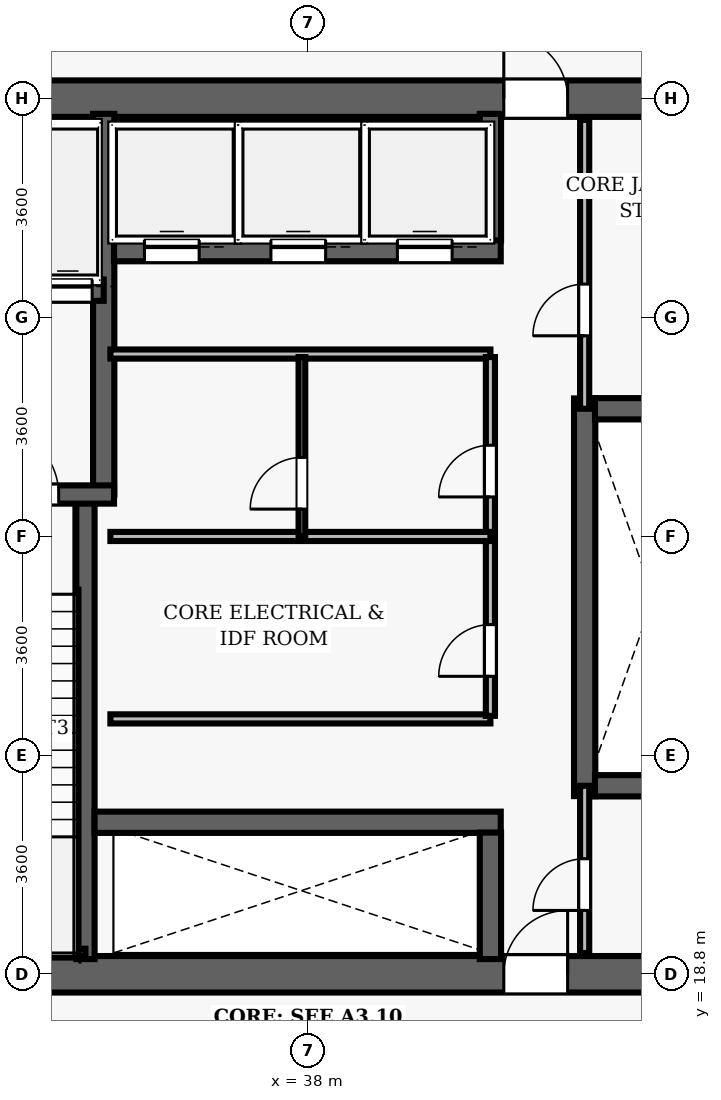
"""IFC4 building model, lengths in metres.
Left out: names, types, materials, properties, quantities, classifications, styles, units other than length and angle.
Written with IfcOpenShell. Run it as: python <this file> out.ifc"""

import sys

from ifc_helpers import new_model, si_unit, direction, frame, frame_2d, origin, place, context, subcontext, project, spatial, rectangle, extrude, element, fill, save


model = new_model("IFC4")
c1 = context("Model", 3, precision=1e-05, world=origin(), true_north=direction((0.0, 1.0)))
c2 = subcontext(c1, "Body", "Model", "MODEL_VIEW")
j1 = project(units=[si_unit("LENGTHUNIT", "METRE"), si_unit("PLANEANGLEUNIT", "RADIAN")], contexts=[c1])
p1 = place(None, origin())
s1 = spatial("IfcSite", under=j1, at=p1, CompositionType="ELEMENT")
p2 = place(p1, origin())
s2 = spatial("IfcBuilding", under=s1, at=p2, CompositionType="ELEMENT")
p3 = place(p2, frame((0.0, 0.0, 97.4)))
s3 = spatial("IfcBuildingStorey", under=s2, at=p3, CompositionType="ELEMENT", Elevation=97.4)
p4 = place(p3, frame((26.7, 18.8, 0.0), z_axis=(0.0, 0.0, 1.0), x_axis=(1.0, 0.0, 0.0)))
e1 = element("IfcWall", 1, at=p4, inside=s3, PredefinedType="SHEAR", context=c2, shape_type="SweptSolid", body=[
    extrude(rectangle(XDim=22.6, YDim=0.6, at=frame_2d((11.3, 0.0))), origin(), (0.0, 0.0, 1.0), 5.4),
])
p5 = place(p4, frame((14.52, 0.0, 0.0)))
e2 = element("IfcOpeningElement", 2, at=p5, cuts=e1, PredefinedType="OPENING", context=c2, shape_type="SweptSolid", body=[
    extrude(rectangle(XDim=1.05, YDim=2.15, at=frame_2d((0.525, 1.075))), frame((0.0, 0.31, 0.0), z_axis=(0.0, -1.0, 0.0), x_axis=(1.0, 0.0, 0.0)), (0.0, 0.0, 1.0), 0.62),
])
p6 = place(p3, frame((26.7, 33.2, 0.0), z_axis=(0.0, 0.0, 1.0), x_axis=(1.0, 0.0, 0.0)))
e3 = element("IfcWall", 3, at=p6, inside=s3, PredefinedType="SHEAR", context=c2, shape_type="SweptSolid", body=[
    extrude(rectangle(XDim=22.6, YDim=0.6, at=frame_2d((11.3, 0.0))), origin(), (0.0, 0.0, 1.0), 5.4),
])
p7 = place(p6, frame((4.62, 0.0, 0.0)))
e4 = element("IfcOpeningElement", 4, at=p7, cuts=e3, PredefinedType="OPENING", context=c2, shape_type="SweptSolid", body=[
    extrude(rectangle(XDim=1.05, YDim=2.15, at=frame_2d((0.525, 1.075))), frame((0.0, 0.31, 0.0), z_axis=(0.0, -1.0, 0.0), x_axis=(1.0, 0.0, 0.0)), (0.0, 0.0, 1.0), 0.62),
])
p8 = place(p6, frame((14.52, 0.0, 0.0)))
e5 = element("IfcOpeningElement", 5, at=p8, cuts=e3, PredefinedType="OPENING", context=c2, shape_type="SweptSolid", body=[
    extrude(rectangle(XDim=1.05, YDim=2.15, at=frame_2d((0.525, 1.075))), frame((0.0, 0.31, 0.0), z_axis=(0.0, -1.0, 0.0), x_axis=(1.0, 0.0, 0.0)), (0.0, 0.0, 1.0), 0.62),
])
p9 = place(p3, frame((34.34, 19.05, 0.0), z_axis=(0.0, 0.0, 1.0), x_axis=(0.0, 1.0, 0.0)))
e6 = element("IfcWall", 6, at=p9, inside=s3, PredefinedType="SHEAR", context=c2, shape_type="SweptSolid", body=[
    extrude(rectangle(XDim=7.5, YDim=0.3, at=frame_2d((3.75, 0.0))), origin(), (0.0, 0.0, 1.0), 5.4),
])
p10 = place(p3, frame((34.64, 26.69, 0.0), z_axis=(0.0, 0.0, 1.0), x_axis=(0.0, 1.0, 0.0)))
e7 = element("IfcWall", 7, at=p10, inside=s3, PredefinedType="SHEAR", context=c2, shape_type="SweptSolid", body=[
    extrude(rectangle(XDim=6.26, YDim=0.35, at=frame_2d((3.13, 0.0))), origin(), (0.0, 0.0, 1.0), 5.4),
])
p11 = place(p3, frame((31.25, 26.69, 0.0), z_axis=(0.0, 0.0, 1.0), x_axis=(1.0, 0.0, 0.0)))
e8 = element("IfcWall", 8, at=p11, inside=s3, PredefinedType="SHEAR", context=c2, shape_type="SweptSolid", body=[
    extrude(rectangle(XDim=3.56, YDim=0.3, at=frame_2d((1.78, 0.0))), origin(), (0.0, 0.0, 1.0), 5.4),
])
p12 = place(p11, frame((1.55, 0.0, 0.0)))
e9 = element("IfcOpeningElement", 9, at=p12, cuts=e8, PredefinedType="OPENING", context=c2, shape_type="SweptSolid", body=[
    extrude(rectangle(XDim=1.1, YDim=2.15, at=frame_2d((0.55, 1.075))), frame((0.0, 0.16, 0.0), z_axis=(0.0, -1.0, 0.0), x_axis=(1.0, 0.0, 0.0)), (0.0, 0.0, 1.0), 0.32),
])
p13 = place(p3, frame((31.3, 19.16, 0.0), z_axis=(0.0, 0.0, 1.0), x_axis=(1.0, 0.0, 0.0)))
e10 = element("IfcWall", 10, at=p13, inside=s3, PredefinedType="SHEAR", context=c2, shape_type="SweptSolid", body=[
    extrude(rectangle(XDim=3.04, YDim=0.12, at=frame_2d((1.52, 0.0))), origin(), (0.0, 0.0, 1.0), 5.4),
])
p14 = place(p3, frame((32.23, 30.05, 0.0), z_axis=(0.0, 0.0, 1.0), x_axis=(1.0, 0.0, 0.0)))
e11 = element("IfcWall", 11, at=p14, inside=s3, PredefinedType="SHEAR", context=c2, shape_type="SweptSolid", body=[
    extrude(rectangle(XDim=2.41, YDim=0.35, at=frame_2d((1.205, 0.0))), origin(), (0.0, 0.0, 1.0), 4.04),
])
p15 = place(p14, frame((0.42, 0.0, 0.0)))
e12 = element("IfcOpeningElement", 12, at=p15, cuts=e11, PredefinedType="OPENING", context=c2, shape_type="SweptSolid", body=[
    extrude(rectangle(XDim=0.8, YDim=2.15, at=frame_2d((0.4, 1.075))), frame((0.0, 0.185, 0.0), z_axis=(0.0, -1.0, 0.0), x_axis=(1.0, 0.0, 0.0)), (0.0, 0.0, 1.0), 0.37),
])
p16 = place(p14, frame((1.42, 0.0, 0.0)))
e13 = element("IfcOpeningElement", 13, at=p16, cuts=e11, PredefinedType="OPENING", context=c2, shape_type="SweptSolid", body=[
    extrude(rectangle(XDim=0.8, YDim=2.15, at=frame_2d((0.4, 1.075))), frame((0.0, 0.185, 0.0), z_axis=(0.0, -1.0, 0.0), x_axis=(1.0, 0.0, 0.0)), (0.0, 0.0, 1.0), 0.37),
])
p17 = place(p3, frame((42.55, 21.73, 0.0), z_axis=(0.0, 0.0, 1.0), x_axis=(0.0, 1.0, 0.0)))
e14 = element("IfcWall", 14, at=p17, inside=s3, PredefinedType="SHEAR", context=c2, shape_type="SweptSolid", body=[
    extrude(rectangle(XDim=6.54, YDim=0.35, at=frame_2d((3.27, 0.0))), origin(), (0.0, 0.0, 1.0), 4.04),
])
for number, where, z_axis, x_axis in (
    (15, (42.72, 21.9, 0.0), (0.0, 0.0, 1.0), (1.0, 0.0, 0.0)),
    (16, (42.72, 28.1, 0.0), (0.0, 0.0, 1.0), (1.0, 0.0, 0.0)),
):
    element("IfcWall", number, at=place(p3, frame(where, z_axis=z_axis, x_axis=x_axis)), inside=s3, PredefinedType="SHEAR", context=c2, shape_type="SweptSolid", body=[
        extrude(rectangle(XDim=2.03, YDim=0.35, at=frame_2d((1.015, 0.0))), origin(), (0.0, 0.0, 1.0), 4.04),
    ])
p18 = place(p3, frame((34.81, 30.7, 0.0), z_axis=(0.0, 0.0, 1.0), x_axis=(1.0, 0.0, 0.0)))
e17 = element("IfcWall", 17, at=p18, inside=s3, PredefinedType="SHEAR", context=c2, shape_type="SweptSolid", body=[
    extrude(rectangle(XDim=6.36, YDim=0.35, at=frame_2d((3.18, 0.0))), origin(), (0.0, 0.0, 1.0), 4.04),
])
p19 = place(p18, frame((0.5, 0.0, 0.0)))
e18 = element("IfcOpeningElement", 18, at=p19, cuts=e17, PredefinedType="OPENING", context=c2, shape_type="SweptSolid", body=[
    extrude(rectangle(XDim=0.9, YDim=2.15, at=frame_2d((0.45, 1.075))), frame((0.0, 0.185, 0.0), z_axis=(0.0, -1.0, 0.0), x_axis=(1.0, 0.0, 0.0)), (0.0, 0.0, 1.0), 0.37),
])
p20 = place(p18, frame((2.58, 0.0, 0.0)))
e19 = element("IfcOpeningElement", 19, at=p20, cuts=e17, PredefinedType="OPENING", context=c2, shape_type="SweptSolid", body=[
    extrude(rectangle(XDim=0.9, YDim=2.15, at=frame_2d((0.45, 1.075))), frame((0.0, 0.185, 0.0), z_axis=(0.0, -1.0, 0.0), x_axis=(1.0, 0.0, 0.0)), (0.0, 0.0, 1.0), 0.37),
])
p21 = place(p18, frame((4.66, 0.0, 0.0)))
e20 = element("IfcOpeningElement", 20, at=p21, cuts=e17, PredefinedType="OPENING", context=c2, shape_type="SweptSolid", body=[
    extrude(rectangle(XDim=0.9, YDim=2.15, at=frame_2d((0.45, 1.075))), frame((0.0, 0.185, 0.0), z_axis=(0.0, -1.0, 0.0), x_axis=(1.0, 0.0, 0.0)), (0.0, 0.0, 1.0), 0.37),
])
p22 = place(p3, frame((41.0, 30.87, 0.0), z_axis=(0.0, 0.0, 1.0), x_axis=(0.0, 1.0, 0.0)))
e21 = element("IfcWall", 21, at=p22, inside=s3, PredefinedType="SHEAR", context=c2, shape_type="SweptSolid", body=[
    extrude(rectangle(XDim=2.08, YDim=0.35, at=frame_2d((1.04, 0.0))), origin(), (0.0, 0.0, 1.0), 4.04),
])
p23 = place(p3, frame((34.49, 21.3, 0.0), z_axis=(0.0, 0.0, 1.0), x_axis=(1.0, 0.0, 0.0)))
e22 = element("IfcWall", 22, at=p23, inside=s3, PredefinedType="SHEAR", context=c2, shape_type="SweptSolid", body=[
    extrude(rectangle(XDim=6.68, YDim=0.35, at=frame_2d((3.34, 0.0))), origin(), (0.0, 0.0, 1.0), 4.04),
])
p24 = place(p3, frame((41.0, 19.05, 0.0), z_axis=(0.0, 0.0, 1.0), x_axis=(0.0, 1.0, 0.0)))
e23 = element("IfcWall", 23, at=p24, inside=s3, PredefinedType="SHEAR", context=c2, shape_type="SweptSolid", body=[
    extrude(rectangle(XDim=2.08, YDim=0.35, at=frame_2d((1.04, 0.0))), origin(), (0.0, 0.0, 1.0), 4.04),
])
for number, where, z_axis, x_axis in (
    (24, (34.75, 29.0, 0.0), (0.0, 0.0, 1.0), (1.0, 0.0, 0.0)),
    (25, (34.75, 23.0, 0.0), (0.0, 0.0, 1.0), (1.0, 0.0, 0.0)),
):
    element("IfcWall", number, at=place(p3, frame(where, z_axis=z_axis, x_axis=x_axis)), inside=s3, PredefinedType="PARTITIONING", context=c2, shape_type="SweptSolid", body=[
        extrude(rectangle(XDim=6.25, YDim=0.15, at=frame_2d((3.125, 0.0))), origin(), (0.0, 0.0, 1.0), 4.04),
    ])
p25 = place(p3, frame((41.0, 23.05, 0.0), z_axis=(0.0, 0.0, 1.0), x_axis=(0.0, 1.0, 0.0)))
e26 = element("IfcWall", 26, at=p25, inside=s3, PredefinedType="PARTITIONING", context=c2, shape_type="SweptSolid", body=[
    extrude(rectangle(XDim=5.9, YDim=0.15, at=frame_2d((2.95, 0.0))), origin(), (0.0, 0.0, 1.0), 4.04),
])
p26 = place(p25, frame((0.65, 0.0, 0.0)))
e27 = element("IfcOpeningElement", 27, at=p26, cuts=e26, PredefinedType="OPENING", context=c2, shape_type="SweptSolid", body=[
    extrude(rectangle(XDim=0.85, YDim=2.1, at=frame_2d((0.425, 1.05))), frame((0.0, 0.085, 0.0), z_axis=(0.0, -1.0, 0.0), x_axis=(1.0, 0.0, 0.0)), (0.0, 0.0, 1.0), 0.17),
])
p27 = place(p25, frame((3.6, 0.0, 0.0)))
e28 = element("IfcOpeningElement", 28, at=p27, cuts=e26, PredefinedType="OPENING", context=c2, shape_type="SweptSolid", body=[
    extrude(rectangle(XDim=0.85, YDim=2.1, at=frame_2d((0.425, 1.05))), frame((0.0, 0.085, 0.0), z_axis=(0.0, -1.0, 0.0), x_axis=(1.0, 0.0, 0.0)), (0.0, 0.0, 1.0), 0.17),
])
p28 = place(p3, frame((34.75, 26.0, 0.0), z_axis=(0.0, 0.0, 1.0), x_axis=(1.0, 0.0, 0.0)))
e29 = element("IfcWall", 29, at=p28, inside=s3, PredefinedType="PARTITIONING", context=c2, shape_type="SweptSolid", body=[
    extrude(rectangle(XDim=6.25, YDim=0.15, at=frame_2d((3.125, 0.0))), origin(), (0.0, 0.0, 1.0), 4.04),
])
p29 = place(p3, frame((37.9, 26.0, 0.0), z_axis=(0.0, 0.0, 1.0), x_axis=(0.0, 1.0, 0.0)))
e30 = element("IfcWall", 30, at=p29, inside=s3, PredefinedType="PARTITIONING", context=c2, shape_type="SweptSolid", body=[
    extrude(rectangle(XDim=2.95, YDim=0.11, at=frame_2d((1.475, 0.0))), origin(), (0.0, 0.0, 1.0), 4.04),
])
p30 = place(p29, frame((0.45, 0.0, 0.0)))
e31 = element("IfcOpeningElement", 31, at=p30, cuts=e30, PredefinedType="OPENING", context=c2, shape_type="SweptSolid", body=[
    extrude(rectangle(XDim=0.85, YDim=2.1, at=frame_2d((0.425, 1.05))), frame((0.0, 0.065, 0.0), z_axis=(0.0, -1.0, 0.0), x_axis=(1.0, 0.0, 0.0)), (0.0, 0.0, 1.0), 0.13),
])
p31 = place(p3, frame((42.55, 28.1, 0.0), z_axis=(0.0, 0.0, 1.0), x_axis=(0.0, 1.0, 0.0)))
e32 = element("IfcWall", 32, at=p31, inside=s3, PredefinedType="PARTITIONING", context=c2, shape_type="SweptSolid", body=[
    extrude(rectangle(XDim=4.75, YDim=0.15, at=frame_2d((2.375, 0.0))), origin(), (0.0, 0.0, 1.0), 4.04),
])
p32 = place(p31, frame((1.2, 0.0, 0.0)))
e33 = element("IfcOpeningElement", 33, at=p32, cuts=e32, PredefinedType="OPENING", context=c2, shape_type="SweptSolid", body=[
    extrude(rectangle(XDim=0.85, YDim=2.1, at=frame_2d((0.425, 1.05))), frame((0.0, 0.085, 0.0), z_axis=(0.0, -1.0, 0.0), x_axis=(1.0, 0.0, 0.0)), (0.0, 0.0, 1.0), 0.17),
])
p33 = place(p3, frame((42.55, 19.15, 0.0), z_axis=(0.0, 0.0, 1.0), x_axis=(0.0, 1.0, 0.0)))
e34 = element("IfcWall", 34, at=p33, inside=s3, PredefinedType="PARTITIONING", context=c2, shape_type="SweptSolid", body=[
    extrude(rectangle(XDim=2.75, YDim=0.15, at=frame_2d((1.375, 0.0))), origin(), (0.0, 0.0, 1.0), 4.04),
])
p34 = place(p33, frame((0.7, 0.0, 0.0)))
e35 = element("IfcOpeningElement", 35, at=p34, cuts=e34, PredefinedType="OPENING", context=c2, shape_type="SweptSolid", body=[
    extrude(rectangle(XDim=0.85, YDim=2.1, at=frame_2d((0.425, 1.05))), frame((0.0, 0.085, 0.0), z_axis=(0.0, -1.0, 0.0), x_axis=(1.0, 0.0, 0.0)), (0.0, 0.0, 1.0), 0.17),
])
p35 = place(p12, origin())
e36 = element("IfcDoor", 36, at=p35, inside=s3, OperationType="SINGLE_SWING_LEFT", PredefinedType="DOOR", context=c2, shape_type="SweptSolid", body=[
    extrude(rectangle(XDim=1.1, YDim=2.15, at=frame_2d((0.55, 1.075))), frame((0.0, 0.025, 0.0), z_axis=(0.0, -1.0, 0.0), x_axis=(1.0, 0.0, 0.0)), (0.0, 0.0, 1.0), 0.05),
])
fill(e9, e36)
p36 = place(p8, origin())
e37 = element("IfcDoor", 37, at=p36, inside=s3, OperationType="SINGLE_SWING_LEFT", PredefinedType="DOOR", context=c2, shape_type="SweptSolid", body=[
    extrude(rectangle(XDim=1.05, YDim=2.15, at=frame_2d((0.525, 1.075))), frame((0.0, 0.025, 0.0), z_axis=(0.0, -1.0, 0.0), x_axis=(1.0, 0.0, 0.0)), (0.0, 0.0, 1.0), 0.05),
])
fill(e5, e37)
p37 = place(p5, origin())
e38 = element("IfcDoor", 38, at=p37, inside=s3, OperationType="SINGLE_SWING_RIGHT", PredefinedType="DOOR", context=c2, shape_type="SweptSolid", body=[
    extrude(rectangle(XDim=1.05, YDim=2.15, at=frame_2d((0.525, 1.075))), frame((0.0, 0.025, 0.0), z_axis=(0.0, -1.0, 0.0), x_axis=(1.0, 0.0, 0.0)), (0.0, 0.0, 1.0), 0.05),
])
fill(e2, e38)
p38 = place(p26, origin())
e39 = element("IfcDoor", 39, at=p38, inside=s3, OperationType="SINGLE_SWING_LEFT", PredefinedType="DOOR", context=c2, shape_type="SweptSolid", body=[
    extrude(rectangle(XDim=0.85, YDim=2.1, at=frame_2d((0.425, 1.05))), frame((0.0, 0.025, 0.0), z_axis=(0.0, -1.0, 0.0), x_axis=(1.0, 0.0, 0.0)), (0.0, 0.0, 1.0), 0.05),
])
fill(e27, e39)
p39 = place(p27, origin())
e40 = element("IfcDoor", 40, at=p39, inside=s3, OperationType="SINGLE_SWING_LEFT", PredefinedType="DOOR", context=c2, shape_type="SweptSolid", body=[
    extrude(rectangle(XDim=0.85, YDim=2.1, at=frame_2d((0.425, 1.05))), frame((0.0, 0.025, 0.0), z_axis=(0.0, -1.0, 0.0), x_axis=(1.0, 0.0, 0.0)), (0.0, 0.0, 1.0), 0.05),
])
fill(e28, e40)
p40 = place(p30, origin())
e41 = element("IfcDoor", 41, at=p40, inside=s3, OperationType="SINGLE_SWING_LEFT", PredefinedType="DOOR", context=c2, shape_type="SweptSolid", body=[
    extrude(rectangle(XDim=0.85, YDim=2.1, at=frame_2d((0.425, 1.05))), frame((0.0, 0.025, 0.0), z_axis=(0.0, -1.0, 0.0), x_axis=(1.0, 0.0, 0.0)), (0.0, 0.0, 1.0), 0.05),
])
fill(e31, e41)
p41 = place(p32, origin())
e42 = element("IfcDoor", 42, at=p41, inside=s3, OperationType="SINGLE_SWING_LEFT", PredefinedType="DOOR", context=c2, shape_type="SweptSolid", body=[
    extrude(rectangle(XDim=0.85, YDim=2.1, at=frame_2d((0.425, 1.05))), frame((0.0, 0.025, 0.0), z_axis=(0.0, -1.0, 0.0), x_axis=(1.0, 0.0, 0.0)), (0.0, 0.0, 1.0), 0.05),
])
fill(e33, e42)
p42 = place(p34, origin())
e43 = element("IfcDoor", 43, at=p42, inside=s3, OperationType="SINGLE_SWING_LEFT", PredefinedType="DOOR", context=c2, shape_type="SweptSolid", body=[
    extrude(rectangle(XDim=0.85, YDim=2.1, at=frame_2d((0.425, 1.05))), frame((0.0, 0.025, 0.0), z_axis=(0.0, -1.0, 0.0), x_axis=(1.0, 0.0, 0.0)), (0.0, 0.0, 1.0), 0.05),
])
fill(e35, e43)
p43 = place(p19, origin())
e44 = element("IfcDoor", 44, at=p43, inside=s3, OperationType="SLIDING_TO_LEFT", PredefinedType="DOOR", context=c2, shape_type="SweptSolid", body=[
    extrude(rectangle(XDim=0.9, YDim=2.15, at=frame_2d((0.45, 1.075))), frame((0.0, 0.025, 0.0), z_axis=(0.0, -1.0, 0.0), x_axis=(1.0, 0.0, 0.0)), (0.0, 0.0, 1.0), 0.05),
])
fill(e18, e44)
p44 = place(p20, origin())
e45 = element("IfcDoor", 45, at=p44, inside=s3, OperationType="SLIDING_TO_LEFT", PredefinedType="DOOR", context=c2, shape_type="SweptSolid", body=[
    extrude(rectangle(XDim=0.9, YDim=2.15, at=frame_2d((0.45, 1.075))), frame((0.0, 0.025, 0.0), z_axis=(0.0, -1.0, 0.0), x_axis=(1.0, 0.0, 0.0)), (0.0, 0.0, 1.0), 0.05),
])
fill(e19, e45)
p45 = place(p21, origin())
e46 = element("IfcDoor", 46, at=p45, inside=s3, OperationType="SLIDING_TO_LEFT", PredefinedType="DOOR", context=c2, shape_type="SweptSolid", body=[
    extrude(rectangle(XDim=0.9, YDim=2.15, at=frame_2d((0.45, 1.075))), frame((0.0, 0.025, 0.0), z_axis=(0.0, -1.0, 0.0), x_axis=(1.0, 0.0, 0.0)), (0.0, 0.0, 1.0), 0.05),
])
fill(e20, e46)
p46 = place(p16, origin())
e47 = element("IfcDoor", 47, at=p46, inside=s3, OperationType="SLIDING_TO_LEFT", PredefinedType="DOOR", context=c2, shape_type="SweptSolid", body=[
    extrude(rectangle(XDim=0.8, YDim=2.15, at=frame_2d((0.4, 1.075))), frame((0.0, 0.025, 0.0), z_axis=(0.0, -1.0, 0.0), x_axis=(1.0, 0.0, 0.0)), (0.0, 0.0, 1.0), 0.05),
])
fill(e13, e47)
save(model, sys.argv[1])
